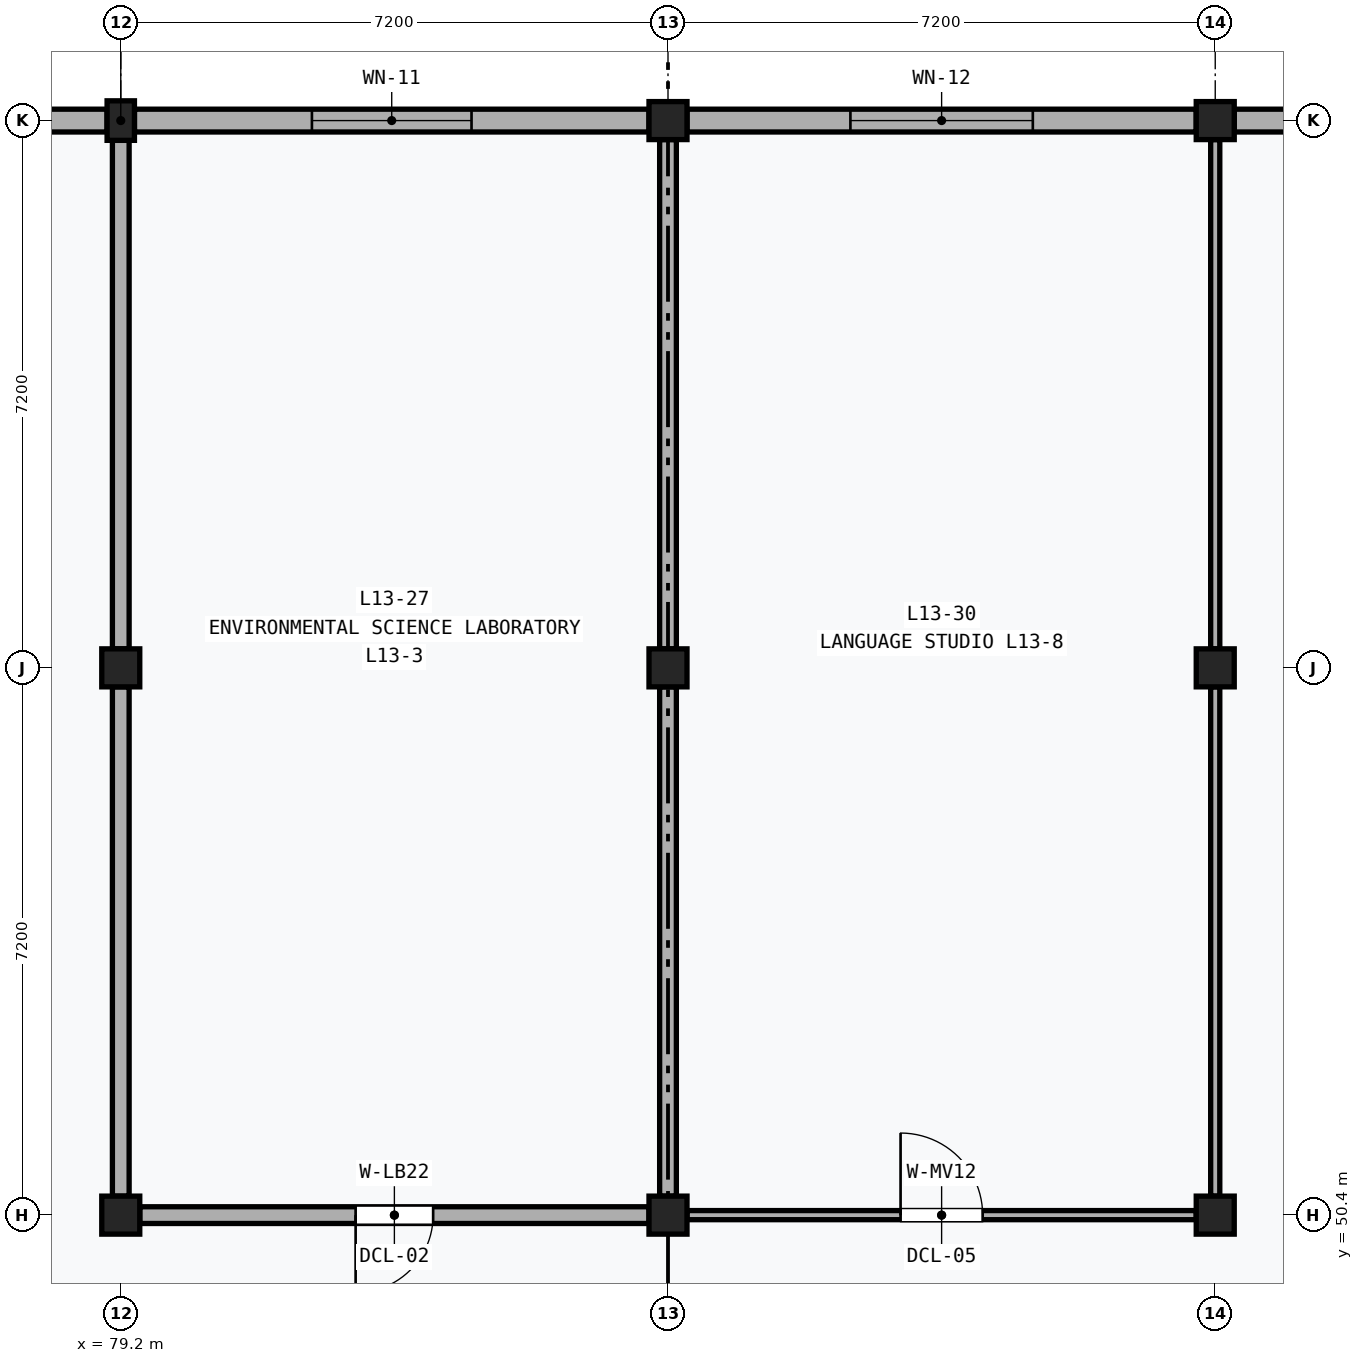
"""IFC4 building model, lengths in metres.
Left out: names, types, materials, properties, quantities, classifications, styles, units other than length and angle.
Written with IfcOpenShell. Run it as: python <this file> out.ifc"""

import sys

from ifc_helpers import new_model, si_unit, direction, frame, frame_2d, origin, origin_2d, place, context, subcontext, project, spatial, rectangle, extrude, element, fill, save


model = new_model("IFC4")
c1 = context("Model", 3, precision=1e-05, world=origin(), true_north=direction((0.0, 1.0)))
c2 = subcontext(c1, "Body", "Model", "MODEL_VIEW")
j1 = project(units=[si_unit("LENGTHUNIT", "METRE"), si_unit("PLANEANGLEUNIT", "RADIAN")], contexts=[c1])
p1 = place(None, origin())
s1 = spatial("IfcSite", under=j1, at=p1, CompositionType="ELEMENT")
p2 = place(p1, origin())
s2 = spatial("IfcBuilding", under=s1, at=p2, CompositionType="ELEMENT")
p3 = place(p2, frame((0.0, 0.0, 55.0)))
s3 = spatial("IfcBuildingStorey", under=s2, at=p3, CompositionType="ELEMENT", Elevation=55.0)
for number, where, z_axis, x_axis in (
    (1, (79.2, 50.4, 0.0), (0.0, 0.0, 1.0), (1.0, 0.0, 0.0)),
    (2, (79.2, 57.6, 0.0), (0.0, 0.0, 1.0), (1.0, 0.0, 0.0)),
):
    element("IfcColumn", number, at=place(p3, frame(where, z_axis=z_axis, x_axis=x_axis)), inside=s3, PredefinedType="COLUMN", context=c2, shape_type="SweptSolid", body=[
        extrude(rectangle(XDim=0.5, YDim=0.5, at=origin_2d()), origin(), (0.0, 0.0, 1.0), 4.0),
    ])
p4 = place(p3, frame((79.2, 64.8, 0.0), z_axis=(0.0, 0.0, 1.0), x_axis=(1.0, 0.0, 0.0)))
e3 = element("IfcColumn", 3, at=p4, inside=s3, PredefinedType="PILASTER", context=c2, shape_type="SweptSolid", body=[
    extrude(rectangle(XDim=0.36, YDim=0.52, at=origin_2d()), origin(), (0.0, 0.0, 1.0), 4.0),
])
for number, where, z_axis, x_axis in (
    (4, (86.4, 50.4, 0.0), (0.0, 0.0, 1.0), (1.0, 0.0, 0.0)),
    (5, (86.4, 57.6, 0.0), (0.0, 0.0, 1.0), (1.0, 0.0, 0.0)),
    (6, (86.4, 64.8, 0.0), (0.0, 0.0, 1.0), (1.0, 0.0, 0.0)),
    (7, (93.6, 50.4, 0.0), (0.0, 0.0, 1.0), (1.0, 0.0, 0.0)),
    (8, (93.6, 57.6, 0.0), (0.0, 0.0, 1.0), (1.0, 0.0, 0.0)),
    (9, (93.6, 64.8, 0.0), (0.0, 0.0, 1.0), (1.0, 0.0, 0.0)),
):
    element("IfcColumn", number, at=place(p3, frame(where, z_axis=z_axis, x_axis=x_axis)), inside=s3, PredefinedType="COLUMN", context=c2, shape_type="SweptSolid", body=[
        extrude(rectangle(XDim=0.5, YDim=0.5, at=origin_2d()), origin(), (0.0, 0.0, 1.0), 4.0),
    ])
p5 = place(p3, frame((72.25, 64.8, 0.0), z_axis=(0.0, 0.0, 1.0), x_axis=(1.0, 0.0, 0.0)))
e10 = element("IfcWall", 10, at=p5, inside=s3, PredefinedType="SOLIDWALL", context=c2, shape_type="SweptSolid", body=[
    extrude(rectangle(XDim=6.77, YDim=0.3, at=frame_2d((3.385, 0.0))), origin(), (0.0, 0.0, 1.0), 3.17),
])
p6 = place(p5, frame((2.485, 0.0, 0.85)))
e11 = element("IfcOpeningElement", 11, at=p6, cuts=e10, PredefinedType="OPENING", context=c2, shape_type="SweptSolid", body=[
    extrude(rectangle(XDim=1.8, YDim=2.0, at=frame_2d((0.9, 1.0))), frame((0.0, 0.162, 0.0), z_axis=(0.0, -1.0, 0.0), x_axis=(1.0, 0.0, 0.0)), (0.0, 0.0, 1.0), 0.324),
])
p7 = place(p3, frame((79.38, 64.8, 0.0), z_axis=(0.0, 0.0, 1.0), x_axis=(1.0, 0.0, 0.0)))
e12 = element("IfcWall", 12, at=p7, inside=s3, PredefinedType="SOLIDWALL", context=c2, shape_type="SweptSolid", body=[
    extrude(rectangle(XDim=6.77, YDim=0.3, at=frame_2d((3.385, 0.0))), origin(), (0.0, 0.0, 1.0), 3.17),
])
p8 = place(p7, frame((2.335, 0.0, 0.85)))
e13 = element("IfcOpeningElement", 13, at=p8, cuts=e12, PredefinedType="OPENING", context=c2, shape_type="SweptSolid", body=[
    extrude(rectangle(XDim=2.1, YDim=2.0, at=frame_2d((1.05, 1.0))), frame((0.0, 0.162, 0.0), z_axis=(0.0, -1.0, 0.0), x_axis=(1.0, 0.0, 0.0)), (0.0, 0.0, 1.0), 0.324),
])
p9 = place(p3, frame((86.65, 64.8, 0.0), z_axis=(0.0, 0.0, 1.0), x_axis=(1.0, 0.0, 0.0)))
e14 = element("IfcWall", 14, at=p9, inside=s3, PredefinedType="SOLIDWALL", context=c2, shape_type="SweptSolid", body=[
    extrude(rectangle(XDim=6.7, YDim=0.3, at=frame_2d((3.35, 0.0))), origin(), (0.0, 0.0, 1.0), 3.17),
])
p10 = place(p9, frame((2.15, 0.0, 0.85)))
e15 = element("IfcOpeningElement", 15, at=p10, cuts=e14, PredefinedType="OPENING", context=c2, shape_type="SweptSolid", body=[
    extrude(rectangle(XDim=2.4, YDim=2.0, at=frame_2d((1.2, 1.0))), frame((0.0, 0.162, 0.0), z_axis=(0.0, -1.0, 0.0), x_axis=(1.0, 0.0, 0.0)), (0.0, 0.0, 1.0), 0.324),
])
p11 = place(p3, frame((93.85, 64.8, 0.0), z_axis=(0.0, 0.0, 1.0), x_axis=(1.0, 0.0, 0.0)))
e16 = element("IfcWall", 16, at=p11, inside=s3, PredefinedType="SOLIDWALL", context=c2, shape_type="SweptSolid", body=[
    extrude(rectangle(XDim=6.7, YDim=0.3, at=frame_2d((3.35, 0.0))), origin(), (0.0, 0.0, 1.0), 3.17),
])
p12 = place(p11, frame((2.0, 0.0, 0.85)))
e17 = element("IfcOpeningElement", 17, at=p12, cuts=e16, PredefinedType="OPENING", context=c2, shape_type="SweptSolid", body=[
    extrude(rectangle(XDim=2.7, YDim=2.0, at=frame_2d((1.35, 1.0))), frame((0.0, 0.162, 0.0), z_axis=(0.0, -1.0, 0.0), x_axis=(1.0, 0.0, 0.0)), (0.0, 0.0, 1.0), 0.324),
])
p13 = place(p3, frame((79.45, 50.4, 0.0), z_axis=(0.0, 0.0, 1.0), x_axis=(1.0, 0.0, 0.0)))
e18 = element("IfcWall", 18, at=p13, inside=s3, PredefinedType="PARTITIONING", context=c2, shape_type="SweptSolid", body=[
    extrude(rectangle(XDim=6.7, YDim=0.22, at=frame_2d((3.35, 0.0))), origin(), (0.0, 0.0, 1.0), 3.09),
])
p14 = place(p13, frame((2.84, 0.0, 0.0)))
e19 = element("IfcOpeningElement", 19, at=p14, cuts=e18, PredefinedType="OPENING", context=c2, shape_type="SweptSolid", body=[
    extrude(rectangle(XDim=1.02, YDim=2.12, at=frame_2d((0.51, 1.06))), frame((0.0, 0.122, 0.0), z_axis=(0.0, -1.0, 0.0), x_axis=(1.0, 0.0, 0.0)), (0.0, 0.0, 1.0), 0.244),
])
for number, where, z_axis, x_axis in (
    (20, (79.2, 50.65, 0.0), (0.0, 0.0, 1.0), (0.0, 1.0, 0.0)),
    (21, (86.4, 50.65, 0.0), (0.0, 0.0, 1.0), (0.0, 1.0, 0.0)),
):
    element("IfcWall", number, at=place(p3, frame(where, z_axis=z_axis, x_axis=x_axis)), inside=s3, PredefinedType="PARTITIONING", context=c2, shape_type="SweptSolid", body=[
        extrude(rectangle(XDim=6.7, YDim=0.22, at=frame_2d((3.35, 0.0))), origin(), (0.0, 0.0, 1.0), 3.09),
    ])
p15 = place(p3, frame((79.2, 57.85, 0.0), z_axis=(0.0, 0.0, 1.0), x_axis=(0.0, 1.0, 0.0)))
e22 = element("IfcWall", 22, at=p15, inside=s3, PredefinedType="PARTITIONING", context=c2, shape_type="SweptSolid", body=[
    extrude(rectangle(XDim=6.69, YDim=0.22, at=frame_2d((3.345, 0.0))), origin(), (0.0, 0.0, 1.0), 3.09),
])
p16 = place(p3, frame((86.4, 57.85, 0.0), z_axis=(0.0, 0.0, 1.0), x_axis=(0.0, 1.0, 0.0)))
e23 = element("IfcWall", 23, at=p16, inside=s3, PredefinedType="PARTITIONING", context=c2, shape_type="SweptSolid", body=[
    extrude(rectangle(XDim=6.7, YDim=0.22, at=frame_2d((3.35, 0.0))), origin(), (0.0, 0.0, 1.0), 3.09),
])
p17 = place(p3, frame((86.65, 50.4, 0.0), z_axis=(0.0, 0.0, 1.0), x_axis=(1.0, 0.0, 0.0)))
e24 = element("IfcWall", 24, at=p17, inside=s3, PredefinedType="MOVABLE", context=c2, shape_type="SweptSolid", body=[
    extrude(rectangle(XDim=6.7, YDim=0.12, at=frame_2d((3.35, 0.0))), origin(), (0.0, 0.0, 1.0), 3.09),
])
p18 = place(p17, frame((2.81, 0.0, 0.0)))
e25 = element("IfcOpeningElement", 25, at=p18, cuts=e24, PredefinedType="OPENING", context=c2, shape_type="SweptSolid", body=[
    extrude(rectangle(XDim=1.08, YDim=2.18, at=frame_2d((0.54, 1.09))), frame((0.0, 0.072, 0.0), z_axis=(0.0, -1.0, 0.0), x_axis=(1.0, 0.0, 0.0)), (0.0, 0.0, 1.0), 0.144),
])
p19 = place(p3, frame((93.6, 50.65, 0.0), z_axis=(0.0, 0.0, 1.0), x_axis=(0.0, 1.0, 0.0)))
e26 = element("IfcWall", 26, at=p19, inside=s3, PredefinedType="MOVABLE", context=c2, shape_type="SweptSolid", body=[
    extrude(rectangle(XDim=6.7, YDim=0.12, at=frame_2d((3.35, 0.0))), origin(), (0.0, 0.0, 1.0), 3.09),
])
p20 = place(p3, frame((93.6, 57.85, 0.0), z_axis=(0.0, 0.0, 1.0), x_axis=(0.0, 1.0, 0.0)))
e27 = element("IfcWall", 27, at=p20, inside=s3, PredefinedType="MOVABLE", context=c2, shape_type="SweptSolid", body=[
    extrude(rectangle(XDim=6.7, YDim=0.12, at=frame_2d((3.35, 0.0))), origin(), (0.0, 0.0, 1.0), 3.09),
])
p21 = place(p8, origin())
e28 = element("IfcWindow", 28, at=p21, inside=s3, PartitioningType="SINGLE_PANEL", PredefinedType="WINDOW", context=c2, shape_type="SweptSolid", body=[
    extrude(rectangle(XDim=2.1, YDim=2.0, at=frame_2d((1.05, 1.0))), frame((0.0, 0.03, 0.0), z_axis=(0.0, -1.0, 0.0), x_axis=(1.0, 0.0, 0.0)), (0.0, 0.0, 1.0), 0.06),
])
fill(e13, e28)
p22 = place(p10, origin())
e29 = element("IfcWindow", 29, at=p22, inside=s3, PartitioningType="SINGLE_PANEL", PredefinedType="WINDOW", context=c2, shape_type="SweptSolid", body=[
    extrude(rectangle(XDim=2.4, YDim=2.0, at=frame_2d((1.2, 1.0))), frame((0.0, 0.03, 0.0), z_axis=(0.0, -1.0, 0.0), x_axis=(1.0, 0.0, 0.0)), (0.0, 0.0, 1.0), 0.06),
])
fill(e15, e29)
p23 = place(p14, frame((1.02, 0.0, 0.0), z_axis=(0.0, 0.0, 1.0), x_axis=(-1.0, 0.0, 0.0)))
e30 = element("IfcDoor", 30, at=p23, inside=s3, OperationType="SINGLE_SWING_RIGHT", PredefinedType="DOOR", context=c2, shape_type="SweptSolid", body=[
    extrude(rectangle(XDim=1.02, YDim=2.12, at=frame_2d((0.51, 1.06))), frame((0.0, 0.025, 0.0), z_axis=(0.0, -1.0, 0.0), x_axis=(1.0, 0.0, 0.0)), (0.0, 0.0, 1.0), 0.05),
])
fill(e19, e30)
p24 = place(p18, origin())
e31 = element("IfcDoor", 31, at=p24, inside=s3, OperationType="SINGLE_SWING_LEFT", PredefinedType="DOOR", context=c2, shape_type="SweptSolid", body=[
    extrude(rectangle(XDim=1.08, YDim=2.18, at=frame_2d((0.54, 1.09))), frame((0.0, 0.025, 0.0), z_axis=(0.0, -1.0, 0.0), x_axis=(1.0, 0.0, 0.0)), (0.0, 0.0, 1.0), 0.05),
])
fill(e25, e31)
save(model, sys.argv[1])
